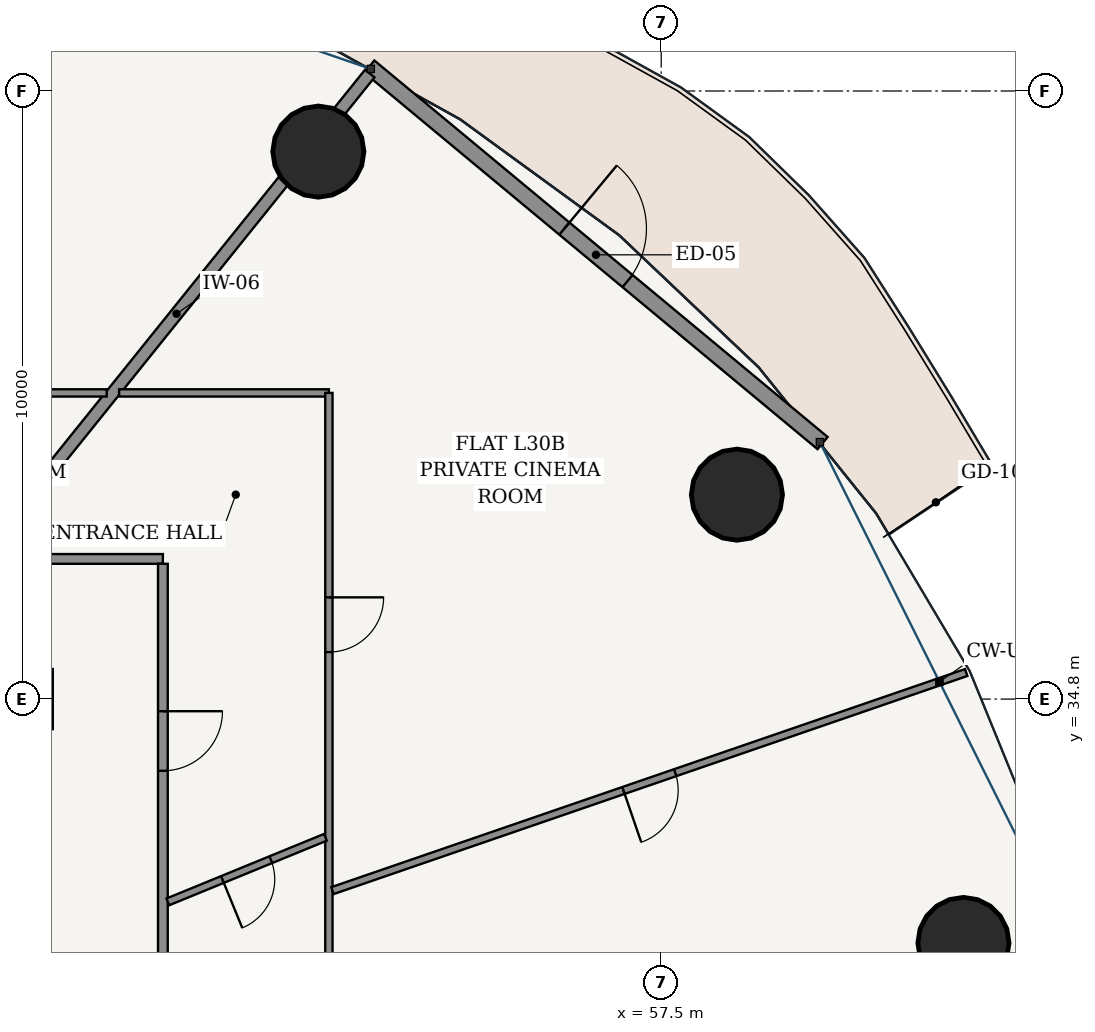
"""IFC4 building model, lengths in metres.
Left out: names, types, materials, properties, quantities, classifications, styles, units other than length and angle.
Written with IfcOpenShell. Run it as: python <this file> out.ifc"""

import sys

from ifc_helpers import new_model, si_unit, direction, frame, frame_2d, origin, origin_2d, place, context, subcontext, project, spatial, rectangle, hollow_circle, extrude, source, transform, mapped, element, fill, save


model = new_model("IFC4")
c1 = context("Model", 3, precision=1e-05, world=origin(), true_north=direction((-0.2419218956, 0.970295726276)))
c2 = subcontext(c1, "Body", "Model", "MODEL_VIEW")
j1 = project(units=[si_unit("LENGTHUNIT", "METRE"), si_unit("PLANEANGLEUNIT", "RADIAN")], contexts=[c1])
p1 = place(None, origin())
s1 = spatial("IfcSite", under=j1, at=p1, CompositionType="ELEMENT")
p2 = place(p1, origin())
s2 = spatial("IfcBuilding", under=s1, at=p2, CompositionType="ELEMENT")
p3 = place(p2, frame((0.0, 0.0, 115.8)))
s3 = spatial("IfcBuildingStorey", under=s2, at=p3, CompositionType="ELEMENT", Elevation=115.8)
for number, where, z_axis, x_axis in (
    (1, (62.471, 30.79, 0.0), (0.0, 0.0, 1.0), (1.0, 0.0, 0.0)),
    (2, (58.745, 38.161, 0.0), (0.0, 0.0, 1.0), (1.0, 0.0, 0.0)),
    (3, (51.862, 43.803, 0.0), (0.0, 0.0, 1.0), (1.0, 0.0, 0.0)),
):
    element("IfcColumn", number, at=place(p3, frame(where, z_axis=z_axis, x_axis=x_axis)), inside=s3, PredefinedType="COLUMN", context=c2, shape_type="SweptSolid", body=[
        extrude(hollow_circle(Radius=0.75, WallThickness=0.045, at=origin_2d()), origin(), (0.0, 0.0, 1.0), 3.6),
    ])
p4 = place(p3, frame((60.154, 39.01, 0.0), z_axis=(0.0, 0.0, 1.0), x_axis=(-0.769242574941, 0.638956853706, 0.0)))
e4 = element("IfcWall", 4, at=p4, inside=s3, PredefinedType="SOLIDWALL", context=c2, shape_type="SweptSolid", body=[
    extrude(rectangle(XDim=9.69, YDim=0.26, at=frame_2d((4.845, 0.0))), origin(), (0.0, 0.0, 1.0), 3.325),
])
p5 = place(p4, frame((4.17, 0.0, 0.0)))
e5 = element("IfcOpeningElement", 5, at=p5, cuts=e4, PredefinedType="OPENING", context=c2, shape_type="SweptSolid", body=[
    extrude(rectangle(XDim=1.35, YDim=2.2, at=frame_2d((0.675, 1.1))), frame((0.0, 0.14, 0.0), z_axis=(0.0, -1.0, 0.0), x_axis=(1.0, 0.0, 0.0)), (0.0, 0.0, 1.0), 0.28),
])
p6 = place(p3, frame((26.695, 37.105, 0.0), z_axis=(0.0, 0.0, 1.0), x_axis=(1.0, 0.0, 0.0)))
e6 = element("IfcWall", 6, at=p6, inside=s3, PredefinedType="PARTITIONING", context=c2, shape_type="SweptSolid", body=[
    extrude(rectangle(XDim=22.61, YDim=0.16, at=frame_2d((11.305, 0.0))), origin(), (0.0, 0.0, 1.0), 2.767),
])
p7 = place(p3, frame((49.305, 16.575, 0.0), z_axis=(0.0, 0.0, 1.0), x_axis=(0.0, 1.0, 0.0)))
e7 = element("IfcWall", 7, at=p7, inside=s3, PredefinedType="PARTITIONING", context=c2, shape_type="SweptSolid", body=[
    extrude(rectangle(XDim=20.45, YDim=0.16, at=frame_2d((10.225, 0.0))), origin(), (0.0, 0.0, 1.0), 2.767),
])
p8 = place(p7, frame((17.046, 0.0, 0.0)))
e8 = element("IfcOpeningElement", 8, at=p8, cuts=e7, PredefinedType="OPENING", context=c2, shape_type="SweptSolid", body=[
    extrude(rectangle(XDim=0.98, YDim=2.2, at=frame_2d((0.49, 1.1))), frame((0.0, 0.09, 0.0), z_axis=(0.0, -1.0, 0.0), x_axis=(1.0, 0.0, 0.0)), (0.0, 0.0, 1.0), 0.18),
])
p9 = place(p3, frame((46.352, 37.185, 0.0), z_axis=(0.0, 0.0, 1.0), x_axis=(0.626712884514, 0.779250255299, 0.0)))
e9 = element("IfcWall", 9, at=p9, inside=s3, PredefinedType="PARTITIONING", context=c2, shape_type="SweptSolid", body=[
    extrude(rectangle(XDim=10.141, YDim=0.2, at=frame_2d((5.07, 0.0))), origin(), (0.0, 0.0, 1.0), 2.767),
])
p10 = place(p3, frame((23.965, 39.835, 0.0), z_axis=(0.0, 0.0, 1.0), x_axis=(1.0, 0.0, 0.0)))
e10 = element("IfcWall", 10, at=p10, inside=s3, PredefinedType="PARTITIONING", context=c2, shape_type="SweptSolid", body=[
    extrude(rectangle(XDim=24.416, YDim=0.12, at=frame_2d((12.208, 0.0))), origin(), (0.0, 0.0, 1.0), 2.767),
])
p11 = place(p10, frame((4.192, 0.0, 0.0)))
e11 = element("IfcOpeningElement", 11, at=p11, cuts=e10, PredefinedType="OPENING", context=c2, shape_type="SweptSolid", body=[
    extrude(rectangle(XDim=0.9, YDim=2.15, at=frame_2d((0.45, 1.075))), frame((0.0, 0.07, 0.0), z_axis=(0.0, -1.0, 0.0), x_axis=(1.0, 0.0, 0.0)), (0.0, 0.0, 1.0), 0.14),
])
p12 = place(p10, frame((19.728, 0.0, 0.0)))
e12 = element("IfcOpeningElement", 12, at=p12, cuts=e10, PredefinedType="OPENING", context=c2, shape_type="SweptSolid", body=[
    extrude(rectangle(XDim=0.86, YDim=2.15, at=frame_2d((0.43, 1.075))), frame((0.0, 0.07, 0.0), z_axis=(0.0, -1.0, 0.0), x_axis=(1.0, 0.0, 0.0)), (0.0, 0.0, 1.0), 0.14),
])
p13 = place(p3, frame((48.585, 39.835, 0.0), z_axis=(0.0, 0.0, 1.0), x_axis=(1.0, 0.0, 0.0)))
e13 = element("IfcWall", 13, at=p13, inside=s3, PredefinedType="PARTITIONING", context=c2, shape_type="SweptSolid", body=[
    extrude(rectangle(XDim=3.45, YDim=0.12, at=frame_2d((1.725, 0.0))), origin(), (0.0, 0.0, 1.0), 2.767),
])
p14 = place(p3, frame((52.035, 39.835, 0.0), z_axis=(0.0, 0.0, 1.0), x_axis=(0.0, -1.0, 0.0)))
e14 = element("IfcWall", 14, at=p14, inside=s3, PredefinedType="PARTITIONING", context=c2, shape_type="SweptSolid", body=[
    extrude(rectangle(XDim=26.07, YDim=0.12, at=frame_2d((13.035, 0.0))), origin(), (0.0, 0.0, 1.0), 2.767),
])
p15 = place(p14, frame((3.362, 0.0, 0.0)))
e15 = element("IfcOpeningElement", 15, at=p15, cuts=e14, PredefinedType="OPENING", context=c2, shape_type="SweptSolid", body=[
    extrude(rectangle(XDim=0.9, YDim=2.15, at=frame_2d((0.45, 1.075))), frame((0.0, 0.07, 0.0), z_axis=(0.0, -1.0, 0.0), x_axis=(1.0, 0.0, 0.0)), (0.0, 0.0, 1.0), 0.14),
])
p16 = place(p14, frame((13.924, 0.0, 0.0)))
e16 = element("IfcOpeningElement", 16, at=p16, cuts=e14, PredefinedType="OPENING", context=c2, shape_type="SweptSolid", body=[
    extrude(rectangle(XDim=0.9, YDim=2.15, at=frame_2d((0.45, 1.075))), frame((0.0, 0.07, 0.0), z_axis=(0.0, -1.0, 0.0), x_axis=(1.0, 0.0, 0.0)), (0.0, 0.0, 1.0), 0.14),
])
p17 = place(p3, frame((52.094, 31.65, 0.0), z_axis=(0.0, 0.0, 1.0), x_axis=(0.945573120726, 0.32540970078, 0.0)))
e17 = element("IfcWall", 17, at=p17, inside=s3, PredefinedType="PARTITIONING", context=c2, shape_type="SweptSolid", body=[
    extrude(rectangle(XDim=11.022, YDim=0.12, at=frame_2d((5.511, 0.0))), origin(), (0.0, 0.0, 1.0), 2.767),
])
p18 = place(p17, frame((5.061, 0.0, 0.0)))
e18 = element("IfcOpeningElement", 18, at=p18, cuts=e17, PredefinedType="OPENING", context=c2, shape_type="SweptSolid", body=[
    extrude(rectangle(XDim=0.9, YDim=2.15, at=frame_2d((0.45, 1.075))), frame((0.0, 0.07, 0.0), z_axis=(0.0, -1.0, 0.0), x_axis=(1.0, 0.0, 0.0)), (0.0, 0.0, 1.0), 0.14),
])
p19 = place(p3, frame((49.387, 31.465, 0.0), z_axis=(0.0, 0.0, 1.0), x_axis=(0.925328713836, 0.37916588896, 0.0)))
e19 = element("IfcWall", 19, at=p19, inside=s3, PredefinedType="PARTITIONING", context=c2, shape_type="SweptSolid", body=[
    extrude(rectangle(XDim=2.8, YDim=0.12, at=frame_2d((1.4, 0.0))), origin(), (0.0, 0.0, 1.0), 3.325),
])
p20 = place(p19, frame((0.97, 0.0, 0.0)))
e20 = element("IfcOpeningElement", 20, at=p20, cuts=e19, PredefinedType="OPENING", context=c2, shape_type="SweptSolid", body=[
    extrude(rectangle(XDim=0.86, YDim=2.15, at=frame_2d((0.43, 1.075))), frame((0.0, 0.07, 0.0), z_axis=(0.0, -1.0, 0.0), x_axis=(1.0, 0.0, 0.0)), (0.0, 0.0, 1.0), 0.14),
])
m1 = source(origin(), c2, "Body", "SweptSolid", [
    extrude(rectangle(XDim=1.35, YDim=2.2, at=frame_2d((0.675, 1.1))), frame((0.0, 0.025, 0.0), z_axis=(0.0, -1.0, 0.0), x_axis=(1.0, 0.0, 0.0)), (0.0, 0.0, 1.0), 0.05),
])
p21 = place(p5, frame((1.35, 0.0, 0.0), z_axis=(0.0, 0.0, 1.0), x_axis=(-1.0, 0.0, 0.0)))
e21 = element("IfcDoor", 21, at=p21, inside=s3, OperationType="SINGLE_SWING_LEFT", PredefinedType="DOOR", context=c2, shape_type="MappedRepresentation", body=[
    mapped(m1, transform((0.0, 0.0, 0.0), scale=1.0)),
])
fill(e5, e21)
m2 = source(origin(), c2, "Body", "SweptSolid", [
    extrude(rectangle(XDim=0.98, YDim=2.2, at=frame_2d((0.49, 1.1))), frame((0.0, 0.025, 0.0), z_axis=(0.0, -1.0, 0.0), x_axis=(1.0, 0.0, 0.0)), (0.0, 0.0, 1.0), 0.05),
])
p22 = place(p8, frame((0.98, 0.0, 0.0), z_axis=(0.0, 0.0, 1.0), x_axis=(-1.0, 0.0, 0.0)))
e22 = element("IfcDoor", 22, at=p22, inside=s3, OperationType="SINGLE_SWING_LEFT", PredefinedType="DOOR", context=c2, shape_type="MappedRepresentation", body=[
    mapped(m2, transform((0.0, 0.0, 0.0), scale=1.0)),
])
fill(e8, e22)
m3 = source(origin(), c2, "Body", "SweptSolid", [
    extrude(rectangle(XDim=0.86, YDim=2.15, at=frame_2d((0.43, 1.075))), frame((0.0, 0.025, 0.0), z_axis=(0.0, -1.0, 0.0), x_axis=(1.0, 0.0, 0.0)), (0.0, 0.0, 1.0), 0.05),
])
p23 = place(p20, frame((0.86, 0.0, 0.0), z_axis=(0.0, 0.0, 1.0), x_axis=(-1.0, 0.0, 0.0)))
e23 = element("IfcDoor", 23, at=p23, inside=s3, OperationType="SINGLE_SWING_RIGHT", PredefinedType="DOOR", context=c2, shape_type="MappedRepresentation", body=[
    mapped(m3, transform((0.0, 0.0, 0.0), scale=1.0)),
])
fill(e20, e23)
m4 = source(origin(), c2, "Body", "SweptSolid", [
    extrude(rectangle(XDim=0.9, YDim=2.15, at=frame_2d((0.45, 1.075))), frame((0.0, 0.025, 0.0), z_axis=(0.0, -1.0, 0.0), x_axis=(1.0, 0.0, 0.0)), (0.0, 0.0, 1.0), 0.05),
])
p24 = place(p15, origin())
e24 = element("IfcDoor", 24, at=p24, inside=s3, OperationType="SINGLE_SWING_LEFT", PredefinedType="DOOR", context=c2, shape_type="MappedRepresentation", body=[
    mapped(m4, transform((0.0, 0.0, 0.0), scale=1.0)),
])
fill(e15, e24)
p25 = place(p18, frame((0.9, 0.0, 0.0), z_axis=(0.0, 0.0, 1.0), x_axis=(-1.0, 0.0, 0.0)))
e25 = element("IfcDoor", 25, at=p25, inside=s3, OperationType="SINGLE_SWING_RIGHT", PredefinedType="DOOR", context=c2, shape_type="MappedRepresentation", body=[
    mapped(m4, transform((0.0, 0.0, 0.0), scale=1.0)),
])
fill(e18, e25)
save(model, sys.argv[1])
